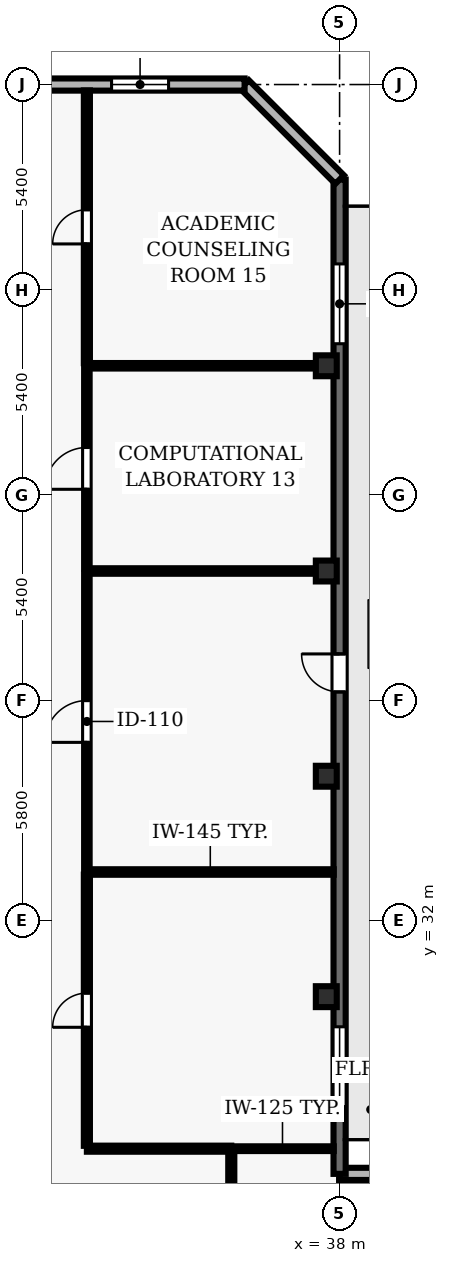
"""IFC4 building model, lengths in metres.
Left out: names, types, materials, properties, quantities, classifications, styles, units other than length and angle.
Written with IfcOpenShell. Run it as: python <this file> out.ifc"""

import sys

from ifc_helpers import new_model, si_unit, direction, frame, frame_2d, origin, origin_2d, place, context, subcontext, project, spatial, rectangle, hollow_rectangle, extrude, element, fill, save


model = new_model("IFC4")
c1 = context("Model", 3, precision=1e-05, world=origin(), true_north=direction((0.0, 1.0)))
c2 = subcontext(c1, "Body", "Model", "MODEL_VIEW")
j1 = project(units=[si_unit("LENGTHUNIT", "METRE"), si_unit("PLANEANGLEUNIT", "RADIAN")], contexts=[c1])
p1 = place(None, origin())
s1 = spatial("IfcSite", under=j1, at=p1, CompositionType="ELEMENT")
p2 = place(p1, origin())
s2 = spatial("IfcBuilding", under=s1, at=p2, CompositionType="ELEMENT")
p3 = place(p2, frame((0.0, 0.0, 81.7)))
s3 = spatial("IfcBuildingStorey", under=s2, at=p3, CompositionType="ELEMENT", Elevation=81.7)
for number, where, z_axis, x_axis in (
    (1, (37.65, 30.0, 0.0), (0.0, 0.0, 1.0), (1.0, 0.0, 0.0)),
    (2, (37.65, 35.8, 0.0), (0.0, 0.0, 1.0), (1.0, 0.0, 0.0)),
    (3, (37.65, 41.2, 0.0), (0.0, 0.0, 1.0), (1.0, 0.0, 0.0)),
    (4, (37.65, 46.6, 0.0), (0.0, 0.0, 1.0), (1.0, 0.0, 0.0)),
):
    element("IfcColumn", number, at=place(p3, frame(where, z_axis=z_axis, x_axis=x_axis)), inside=s3, PredefinedType="COLUMN", context=c2, shape_type="SweptSolid", body=[
        extrude(hollow_rectangle(XDim=0.55, YDim=0.55, WallThickness=0.025, at=origin_2d()), origin(), (0.0, 0.0, 1.0), 3.9),
    ])
p4 = place(p3, frame((47.05, 25.337, 0.0), z_axis=(0.0, 0.0, 1.0), x_axis=(-1.0, 0.0, 0.0)))
e5 = element("IfcWall", 5, at=p4, inside=s3, PredefinedType="SOLIDWALL", context=c2, shape_type="SweptSolid", body=[
    extrude(rectangle(XDim=9.05, YDim=0.32, at=frame_2d((4.525, 0.0))), origin(), (0.0, 0.0, 1.0), 3.69),
])
p5 = place(p4, frame((3.625, 0.0, 0.9)))
e6 = element("IfcOpeningElement", 6, at=p5, cuts=e5, PredefinedType="OPENING", context=c2, shape_type="SweptSolid", body=[
    extrude(rectangle(XDim=1.8, YDim=1.6, at=frame_2d((0.9, 0.8))), frame((0.0, 0.17, 0.0), z_axis=(0.0, -1.0, 0.0), x_axis=(1.0, 0.0, 0.0)), (0.0, 0.0, 1.0), 0.34),
])
p6 = place(p3, frame((38.0, 25.337, 0.0), z_axis=(0.0, 0.0, 1.0), x_axis=(0.0, 1.0, 0.0)))
e7 = element("IfcWall", 7, at=p6, inside=s3, PredefinedType="SOLIDWALL", context=c2, shape_type="SweptSolid", body=[
    extrude(rectangle(XDim=26.163, YDim=0.32, at=frame_2d((13.082, 0.0))), origin(), (0.0, 0.0, 1.0), 3.69),
])
p7 = place(p6, frame((12.681, 0.0, 0.0)))
e8 = element("IfcOpeningElement", 8, at=p7, cuts=e7, PredefinedType="OPENING", context=c2, shape_type="SweptSolid", body=[
    extrude(rectangle(XDim=1.0, YDim=2.2, at=frame_2d((0.5, 1.1))), frame((0.0, 0.17, 0.0), z_axis=(0.0, -1.0, 0.0), x_axis=(1.0, 0.0, 0.0)), (0.0, 0.0, 1.0), 0.34),
])
p8 = place(p6, frame((1.77, 0.0, 0.9)))
e9 = element("IfcOpeningElement", 9, at=p8, cuts=e7, PredefinedType="OPENING", context=c2, shape_type="SweptSolid", body=[
    extrude(rectangle(XDim=2.1, YDim=1.6, at=frame_2d((1.05, 0.8))), frame((0.0, 0.17, 0.0), z_axis=(0.0, -1.0, 0.0), x_axis=(1.0, 0.0, 0.0)), (0.0, 0.0, 1.0), 0.34),
])
p9 = place(p6, frame((21.843, 0.0, 0.9)))
e10 = element("IfcOpeningElement", 10, at=p9, cuts=e7, PredefinedType="OPENING", context=c2, shape_type="SweptSolid", body=[
    extrude(rectangle(XDim=2.1, YDim=1.6, at=frame_2d((1.05, 0.8))), frame((0.0, 0.17, 0.0), z_axis=(0.0, -1.0, 0.0), x_axis=(1.0, 0.0, 0.0)), (0.0, 0.0, 1.0), 0.34),
])
p10 = place(p3, frame((38.0, 51.5, 0.0), z_axis=(0.0, 0.0, 1.0), x_axis=(-0.707106781187, 0.707106781187, 0.0)))
e11 = element("IfcWall", 11, at=p10, inside=s3, PredefinedType="SOLIDWALL", context=c2, shape_type="SweptSolid", body=[
    extrude(rectangle(XDim=3.536, YDim=0.32, at=frame_2d((1.768, 0.0))), origin(), (0.0, 0.0, 1.0), 3.69),
])
p11 = place(p3, frame((35.5, 54.0, 0.0), z_axis=(0.0, 0.0, 1.0), x_axis=(-1.0, 0.0, 0.0)))
e12 = element("IfcWall", 12, at=p11, inside=s3, PredefinedType="SOLIDWALL", context=c2, shape_type="SweptSolid", body=[
    extrude(rectangle(XDim=11.0, YDim=0.32, at=frame_2d((5.5, 0.0))), origin(), (0.0, 0.0, 1.0), 3.69),
])
p12 = place(p11, frame((2.0, 0.0, 0.9)))
e13 = element("IfcOpeningElement", 13, at=p12, cuts=e12, PredefinedType="OPENING", context=c2, shape_type="SweptSolid", body=[
    extrude(rectangle(XDim=1.5, YDim=1.8, at=frame_2d((0.75, 0.9))), frame((0.0, 0.17, 0.0), z_axis=(0.0, -1.0, 0.0), x_axis=(1.0, 0.0, 0.0)), (0.0, 0.0, 1.0), 0.34),
])
p13 = place(p11, frame((7.5, 0.0, 0.9)))
e14 = element("IfcOpeningElement", 14, at=p13, cuts=e12, PredefinedType="OPENING", context=c2, shape_type="SweptSolid", body=[
    extrude(rectangle(XDim=1.5, YDim=1.8, at=frame_2d((0.75, 0.9))), frame((0.0, 0.17, 0.0), z_axis=(0.0, -1.0, 0.0), x_axis=(1.0, 0.0, 0.0)), (0.0, 0.0, 1.0), 0.34),
])
p14 = place(p3, frame((35.15, 26.0, 0.0), z_axis=(0.0, 0.0, 1.0), x_axis=(-1.0, 0.0, 0.0)))
e15 = element("IfcWall", 15, at=p14, inside=s3, PredefinedType="PARTITIONING", context=c2, shape_type="SweptSolid", body=[
    extrude(rectangle(XDim=3.8, YDim=0.16, at=frame_2d((1.9, 0.0))), origin(), (0.0, 0.0, 1.0), 3.69),
])
p15 = place(p3, frame((35.15, 26.0, 0.0), z_axis=(0.0, 0.0, 1.0), x_axis=(1.0, 0.0, 0.0)))
e16 = element("IfcWall", 16, at=p15, inside=s3, PredefinedType="PARTITIONING", context=c2, shape_type="SweptSolid", body=[
    extrude(rectangle(XDim=2.695, YDim=0.125, at=frame_2d((1.348, 0.0))), origin(), (0.0, 0.0, 1.0), 3.69),
])
p16 = place(p3, frame((37.845, 33.28, 0.0), z_axis=(0.0, 0.0, 1.0), x_axis=(-1.0, 0.0, 0.0)))
e17 = element("IfcWall", 17, at=p16, inside=s3, PredefinedType="PARTITIONING", context=c2, shape_type="SweptSolid", body=[
    extrude(rectangle(XDim=6.495, YDim=0.145, at=frame_2d((3.248, 0.0))), origin(), (0.0, 0.0, 1.0), 3.277),
])
for number, where, z_axis, x_axis in (
    (18, (37.845, 41.2, 0.0), (0.0, 0.0, 1.0), (-1.0, 0.0, 0.0)),
    (19, (37.845, 46.6, 0.0), (0.0, 0.0, 1.0), (-1.0, 0.0, 0.0)),
):
    element("IfcWall", number, at=place(p3, frame(where, z_axis=z_axis, x_axis=x_axis)), inside=s3, PredefinedType="PARTITIONING", context=c2, shape_type="SweptSolid", body=[
        extrude(rectangle(XDim=6.495, YDim=0.145, at=frame_2d((3.248, 0.0))), origin(), (0.0, 0.0, 1.0), 3.055),
    ])
p17 = place(p3, frame((31.35, 26.075, 0.0), z_axis=(0.0, 0.0, 1.0), x_axis=(0.0, 1.0, 0.0)))
e20 = element("IfcWall", 20, at=p17, inside=s3, PredefinedType="PARTITIONING", context=c2, shape_type="SweptSolid", body=[
    extrude(rectangle(XDim=7.137, YDim=0.16, at=frame_2d((3.568, 0.0))), origin(), (0.0, 0.0, 1.0), 3.69),
])
p18 = place(p17, frame((3.119, 0.0, 0.0)))
e21 = element("IfcOpeningElement", 21, at=p18, cuts=e20, PredefinedType="OPENING", context=c2, shape_type="SweptSolid", body=[
    extrude(rectangle(XDim=0.9, YDim=2.1, at=frame_2d((0.45, 1.05))), frame((0.0, 0.09, 0.0), z_axis=(0.0, -1.0, 0.0), x_axis=(1.0, 0.0, 0.0)), (0.0, 0.0, 1.0), 0.18),
])
p19 = place(p3, frame((31.35, 33.348, 0.0), z_axis=(0.0, 0.0, 1.0), x_axis=(0.0, 1.0, 0.0)))
e22 = element("IfcWall", 22, at=p19, inside=s3, PredefinedType="PARTITIONING", context=c2, shape_type="SweptSolid", body=[
    extrude(rectangle(XDim=7.785, YDim=0.145, at=frame_2d((3.893, 0.0))), origin(), (0.0, 0.0, 1.0), 3.69),
])
p20 = place(p19, frame((3.343, 0.0, 0.0)))
e23 = element("IfcOpeningElement", 23, at=p20, cuts=e22, PredefinedType="OPENING", context=c2, shape_type="SweptSolid", body=[
    extrude(rectangle(XDim=1.1, YDim=2.15, at=frame_2d((0.55, 1.075))), frame((0.0, 0.083, 0.0), z_axis=(0.0, -1.0, 0.0), x_axis=(1.0, 0.0, 0.0)), (0.0, 0.0, 1.0), 0.165),
])
p21 = place(p3, frame((31.35, 41.268, 0.0), z_axis=(0.0, 0.0, 1.0), x_axis=(0.0, 1.0, 0.0)))
e24 = element("IfcWall", 24, at=p21, inside=s3, PredefinedType="PARTITIONING", context=c2, shape_type="SweptSolid", body=[
    extrude(rectangle(XDim=5.264, YDim=0.145, at=frame_2d((2.632, 0.0))), origin(), (0.0, 0.0, 1.0), 3.69),
])
p22 = place(p21, frame((2.082, 0.0, 0.0)))
e25 = element("IfcOpeningElement", 25, at=p22, cuts=e24, PredefinedType="OPENING", context=c2, shape_type="SweptSolid", body=[
    extrude(rectangle(XDim=1.1, YDim=2.15, at=frame_2d((0.55, 1.075))), frame((0.0, 0.083, 0.0), z_axis=(0.0, -1.0, 0.0), x_axis=(1.0, 0.0, 0.0)), (0.0, 0.0, 1.0), 0.165),
])
p23 = place(p3, frame((31.35, 46.668, 0.0), z_axis=(0.0, 0.0, 1.0), x_axis=(0.0, 1.0, 0.0)))
e26 = element("IfcWall", 26, at=p23, inside=s3, PredefinedType="PARTITIONING", context=c2, shape_type="SweptSolid", body=[
    extrude(rectangle(XDim=7.177, YDim=0.16, at=frame_2d((3.588, 0.0))), origin(), (0.0, 0.0, 1.0), 3.69),
])
p24 = place(p23, frame((3.138, 0.0, 0.0)))
e27 = element("IfcOpeningElement", 27, at=p24, cuts=e26, PredefinedType="OPENING", context=c2, shape_type="SweptSolid", body=[
    extrude(rectangle(XDim=0.9, YDim=2.1, at=frame_2d((0.45, 1.05))), frame((0.0, 0.09, 0.0), z_axis=(0.0, -1.0, 0.0), x_axis=(1.0, 0.0, 0.0)), (0.0, 0.0, 1.0), 0.18),
])
p25 = place(p3, frame((35.15, 24.07, 0.0), z_axis=(0.0, 0.0, 1.0), x_axis=(0.0, 1.0, 0.0)))
e28 = element("IfcWall", 28, at=p25, inside=s3, PredefinedType="PARTITIONING", context=c2, shape_type="SweptSolid", body=[
    extrude(rectangle(XDim=1.855, YDim=0.16, at=frame_2d((0.927, 0.0))), origin(), (0.0, 0.0, 1.0), 3.69),
])
p26 = place(p3, frame((38.05, 25.182, 0.0), z_axis=(0.0, 0.0, 1.0), x_axis=(0.0, -1.0, 0.0)))
e29 = element("IfcWall", 29, at=p26, inside=s3, PredefinedType="PARTITIONING", context=c2, shape_type="SweptSolid", body=[
    extrude(rectangle(XDim=1.132, YDim=0.125, at=frame_2d((0.566, 0.0))), origin(), (0.0, 0.0, 1.0), 3.055),
])
p27 = place(p7, origin())
e30 = element("IfcDoor", 30, at=p27, inside=s3, OperationType="SINGLE_SWING_RIGHT", PredefinedType="DOOR", context=c2, shape_type="SweptSolid", body=[
    extrude(rectangle(XDim=1.0, YDim=2.2, at=frame_2d((0.5, 1.1))), frame((0.0, 0.025, 0.0), z_axis=(0.0, -1.0, 0.0), x_axis=(1.0, 0.0, 0.0)), (0.0, 0.0, 1.0), 0.05),
])
fill(e8, e30)
p28 = place(p8, origin())
e31 = element("IfcWindow", 31, at=p28, inside=s3, PartitioningType="SINGLE_PANEL", PredefinedType="WINDOW", context=c2, shape_type="SweptSolid", body=[
    extrude(rectangle(XDim=2.1, YDim=1.6, at=frame_2d((1.05, 0.8))), frame((0.0, 0.03, 0.0), z_axis=(0.0, -1.0, 0.0), x_axis=(1.0, 0.0, 0.0)), (0.0, 0.0, 1.0), 0.06),
])
fill(e9, e31)
p29 = place(p9, origin())
e32 = element("IfcWindow", 32, at=p29, inside=s3, PartitioningType="SINGLE_PANEL", PredefinedType="WINDOW", context=c2, shape_type="SweptSolid", body=[
    extrude(rectangle(XDim=2.1, YDim=1.6, at=frame_2d((1.05, 0.8))), frame((0.0, 0.03, 0.0), z_axis=(0.0, -1.0, 0.0), x_axis=(1.0, 0.0, 0.0)), (0.0, 0.0, 1.0), 0.06),
])
fill(e10, e32)
p30 = place(p12, origin())
e33 = element("IfcWindow", 33, at=p30, inside=s3, PartitioningType="SINGLE_PANEL", PredefinedType="WINDOW", context=c2, shape_type="SweptSolid", body=[
    extrude(rectangle(XDim=1.5, YDim=1.8, at=frame_2d((0.75, 0.9))), frame((0.0, 0.03, 0.0), z_axis=(0.0, -1.0, 0.0), x_axis=(1.0, 0.0, 0.0)), (0.0, 0.0, 1.0), 0.06),
])
fill(e13, e33)
p31 = place(p18, origin())
e34 = element("IfcDoor", 34, at=p31, inside=s3, OperationType="SINGLE_SWING_LEFT", PredefinedType="DOOR", context=c2, shape_type="SweptSolid", body=[
    extrude(rectangle(XDim=0.9, YDim=2.1, at=frame_2d((0.45, 1.05))), frame((0.0, 0.025, 0.0), z_axis=(0.0, -1.0, 0.0), x_axis=(1.0, 0.0, 0.0)), (0.0, 0.0, 1.0), 0.05),
])
fill(e21, e34)
p32 = place(p20, origin())
e35 = element("IfcDoor", 35, at=p32, inside=s3, OperationType="SINGLE_SWING_LEFT", PredefinedType="DOOR", context=c2, shape_type="SweptSolid", body=[
    extrude(rectangle(XDim=1.1, YDim=2.15, at=frame_2d((0.55, 1.075))), frame((0.0, 0.025, 0.0), z_axis=(0.0, -1.0, 0.0), x_axis=(1.0, 0.0, 0.0)), (0.0, 0.0, 1.0), 0.05),
])
fill(e23, e35)
p33 = place(p22, origin())
e36 = element("IfcDoor", 36, at=p33, inside=s3, OperationType="SINGLE_SWING_LEFT", PredefinedType="DOOR", context=c2, shape_type="SweptSolid", body=[
    extrude(rectangle(XDim=1.1, YDim=2.15, at=frame_2d((0.55, 1.075))), frame((0.0, 0.025, 0.0), z_axis=(0.0, -1.0, 0.0), x_axis=(1.0, 0.0, 0.0)), (0.0, 0.0, 1.0), 0.05),
])
fill(e25, e36)
p34 = place(p24, origin())
e37 = element("IfcDoor", 37, at=p34, inside=s3, OperationType="SINGLE_SWING_LEFT", PredefinedType="DOOR", context=c2, shape_type="SweptSolid", body=[
    extrude(rectangle(XDim=0.9, YDim=2.1, at=frame_2d((0.45, 1.05))), frame((0.0, 0.025, 0.0), z_axis=(0.0, -1.0, 0.0), x_axis=(1.0, 0.0, 0.0)), (0.0, 0.0, 1.0), 0.05),
])
fill(e27, e37)
save(model, sys.argv[1])
